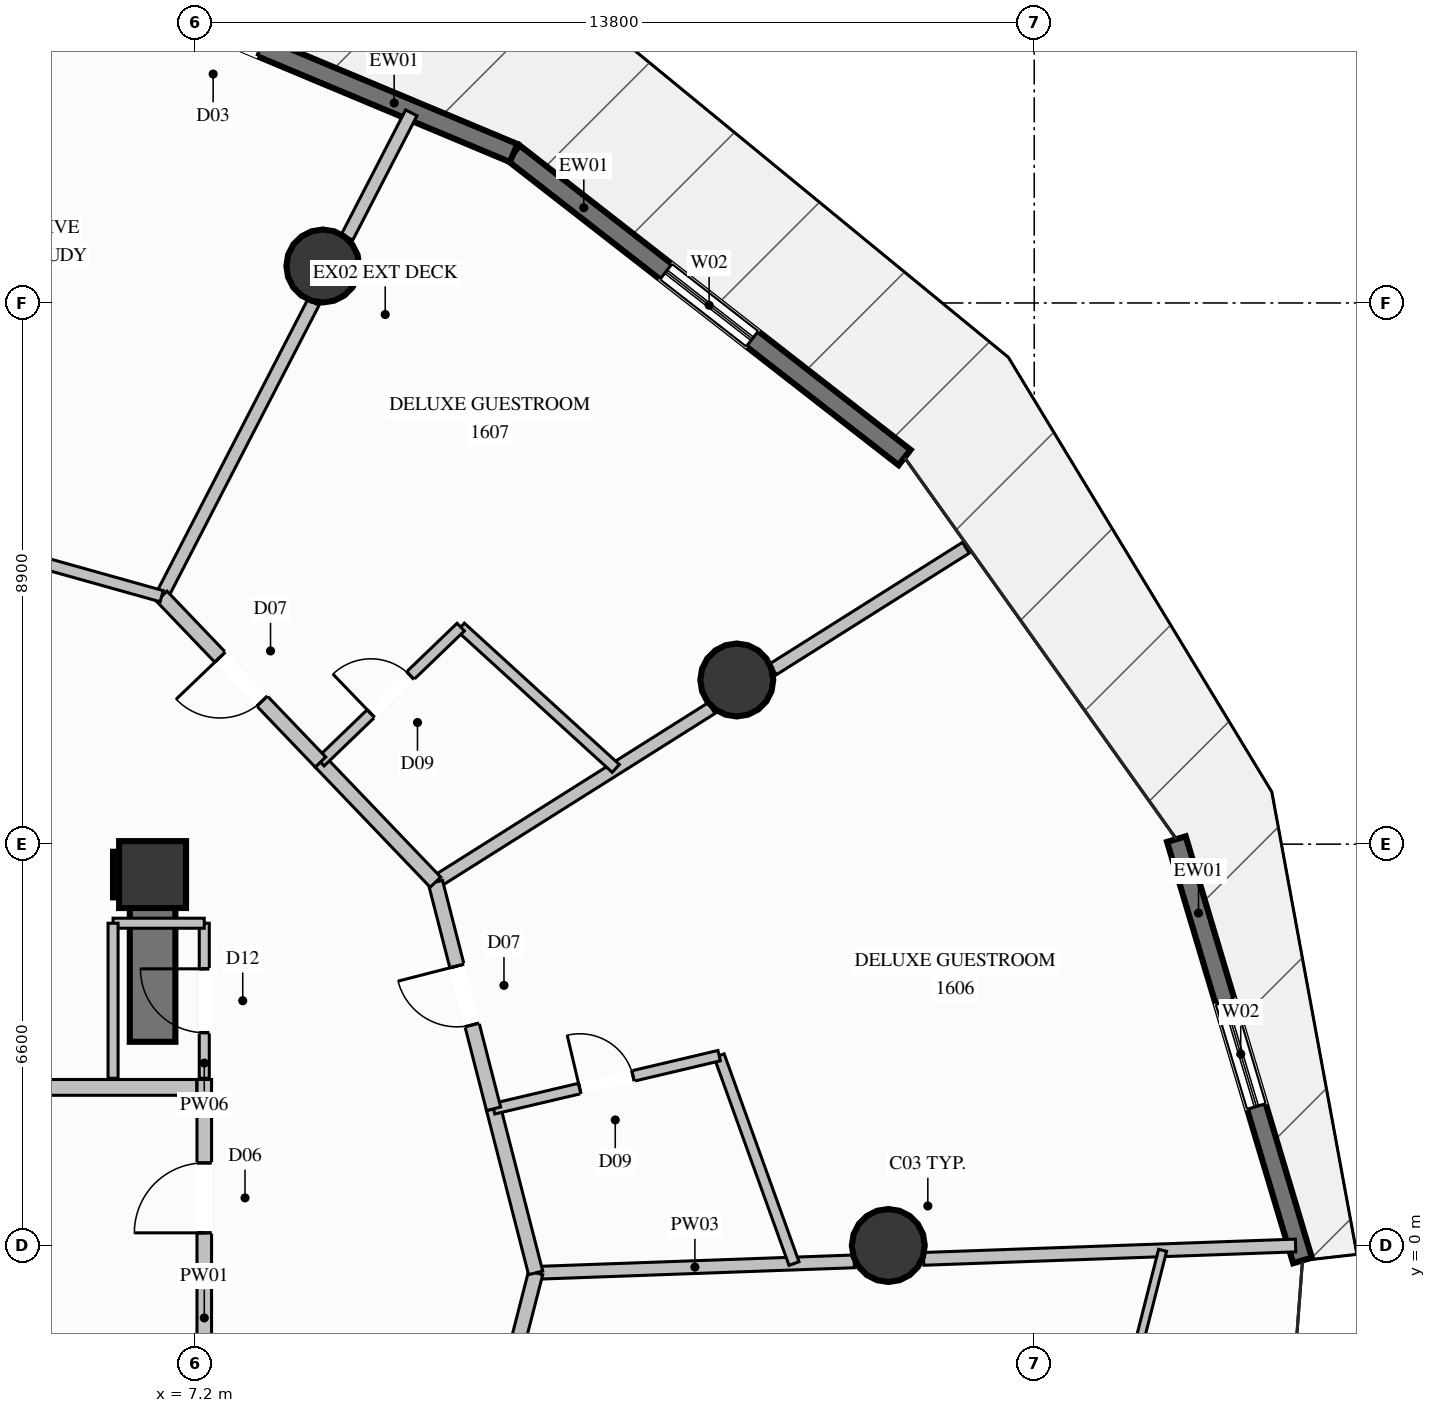
"""IFC4 building model, lengths in metres.
Left out: names, types, materials, properties, quantities, classifications, styles, units other than length and angle.
Written with IfcOpenShell. Run it as: python <this file> out.ifc"""

import sys

from ifc_helpers import new_model, si_unit, direction, frame, frame_2d, origin, origin_2d, place, context, subcontext, project, spatial, rectangle, circle, extrude, element, fill, save


model = new_model("IFC4")
c1 = context("Model", 3, precision=1e-05, world=origin(), true_north=direction((0.0, 1.0)))
c2 = subcontext(c1, "Body", "Model", "MODEL_VIEW")
j1 = project(units=[si_unit("LENGTHUNIT", "METRE"), si_unit("PLANEANGLEUNIT", "RADIAN")], contexts=[c1])
p1 = place(None, origin())
s1 = spatial("IfcSite", under=j1, at=p1, CompositionType="ELEMENT")
p2 = place(p1, origin())
s2 = spatial("IfcBuilding", under=s1, at=p2, CompositionType="ELEMENT")
p3 = place(p2, frame((0.0, 0.0, 60.8)))
s3 = spatial("IfcBuildingStorey", under=s2, at=p3, CompositionType="ELEMENT", Elevation=60.8)
p4 = place(p3, frame((6.5, 6.1, 0.0), z_axis=(0.0, 0.0, 1.0), x_axis=(1.0, 0.0, 0.0)))
e1 = element("IfcColumn", 1, at=p4, inside=s3, PredefinedType="COLUMN", context=c2, shape_type="SweptSolid", body=[
    extrude(rectangle(XDim=1.1, YDim=1.1, at=origin_2d()), origin(), (0.0, 0.0, 1.0), 3.6),
])
p5 = place(p3, frame((5.85, 6.1, 0.0), z_axis=(0.0, 0.0, 1.0), x_axis=(1.0, 0.0, 0.0)))
e2 = element("IfcWall", 2, at=p5, inside=s3, PredefinedType="SHEAR", context=c2, shape_type="SweptSolid", body=[
    extrude(rectangle(XDim=0.275, YDim=0.75, at=frame_2d((0.137, 0.0))), origin(), (0.0, 0.0, 1.0), 3.6),
])
p6 = place(p3, frame((6.5, 3.35, 0.0), z_axis=(0.0, 0.0, 1.0), x_axis=(0.0, 1.0, 0.0)))
e3 = element("IfcWall", 3, at=p6, inside=s3, PredefinedType="SHEAR", context=c2, shape_type="SweptSolid", body=[
    extrude(rectangle(XDim=3.125, YDim=0.75, at=frame_2d((1.562, 0.0))), origin(), (0.0, 0.0, 1.0), 3.6),
])
for number, where, z_axis, x_axis in (
    (4, (18.6, 0.0, 0.0), (0.0, 0.0, 1.0), (1.0, 0.0, 0.0)),
    (5, (16.108, 9.3, 0.0), (0.0, 0.0, 1.0), (1.0, 0.0, 0.0)),
    (6, (9.3, 16.108, 0.0), (0.0, 0.0, 1.0), (1.0, 0.0, 0.0)),
):
    element("IfcColumn", number, at=place(p3, frame(where, z_axis=z_axis, x_axis=x_axis)), inside=s3, PredefinedType="COLUMN", context=c2, shape_type="SweptSolid", body=[
        extrude(circle(Radius=0.6, at=origin_2d()), origin(), (0.0, 0.0, 1.0), 3.6),
    ])
p7 = place(p3, frame((23.338, 6.683, 0.0), z_axis=(0.0, 0.0, 1.0), x_axis=(0.286771852206, -0.957998906462, 0.0)))
e7 = element("IfcWall", 7, at=p7, inside=s3, PredefinedType="SOLIDWALL", context=c2, shape_type="SweptSolid", body=[
    extrude(rectangle(XDim=7.233, YDim=0.32, at=frame_2d((3.616, 0.0))), origin(), (0.0, 0.0, 1.0), 3.34),
])
p8 = place(p7, frame((2.789, 0.0, 0.35)))
e8 = element("IfcOpeningElement", 8, at=p8, cuts=e7, PredefinedType="OPENING", context=c2, shape_type="SweptSolid", body=[
    extrude(rectangle(XDim=1.8, YDim=2.6, at=frame_2d((0.9, 1.3))), frame((0.0, 0.17, 0.0), z_axis=(0.0, -1.0, 0.0), x_axis=(1.0, 0.0, 0.0)), (0.0, 0.0, 1.0), 0.34),
])
p9 = place(p3, frame((12.438, 17.966, 0.0), z_axis=(0.0, 0.0, 1.0), x_axis=(0.788993974252, -0.614400934728, 0.0)))
e9 = element("IfcWall", 9, at=p9, inside=s3, PredefinedType="SOLIDWALL", context=c2, shape_type="SweptSolid", body=[
    extrude(rectangle(XDim=8.149, YDim=0.32, at=frame_2d((4.075, 0.0))), origin(), (0.0, 0.0, 1.0), 3.34),
])
p10 = place(p9, frame((3.175, 0.0, 0.35)))
e10 = element("IfcOpeningElement", 10, at=p10, cuts=e9, PredefinedType="OPENING", context=c2, shape_type="SweptSolid", body=[
    extrude(rectangle(XDim=1.8, YDim=2.6, at=frame_2d((0.9, 1.3))), frame((0.0, 0.17, 0.0), z_axis=(0.0, -1.0, 0.0), x_axis=(1.0, 0.0, 0.0)), (0.0, 0.0, 1.0), 0.34),
])
p11 = place(p3, frame((4.677, 21.214, 0.0), z_axis=(0.0, 0.0, 1.0), x_axis=(0.922472234025, -0.386063437084, 0.0)))
e11 = element("IfcWall", 11, at=p11, inside=s3, PredefinedType="SOLIDWALL", context=c2, shape_type="SweptSolid", body=[
    extrude(rectangle(XDim=8.413, YDim=0.32, at=frame_2d((4.207, 0.0))), origin(), (0.0, 0.0, 1.0), 3.34),
])
p12 = place(p11, frame((0.476, 0.0, 0.35)))
e12 = element("IfcOpeningElement", 12, at=p12, cuts=e11, PredefinedType="OPENING", context=c2, shape_type="SweptSolid", body=[
    extrude(rectangle(XDim=1.8, YDim=2.6, at=frame_2d((0.9, 1.3))), frame((0.0, 0.17, 0.0), z_axis=(0.0, -1.0, 0.0), x_axis=(1.0, 0.0, 0.0)), (0.0, 0.0, 1.0), 0.34),
])
p13 = place(p11, frame((2.803, 0.0, 0.0)))
e13 = element("IfcOpeningElement", 13, at=p13, cuts=e11, PredefinedType="OPENING", context=c2, shape_type="SweptSolid", body=[
    extrude(rectangle(XDim=1.1, YDim=2.2, at=frame_2d((0.55, 1.1))), frame((0.0, 0.17, 0.0), z_axis=(0.0, -1.0, 0.0), x_axis=(1.0, 0.0, 0.0)), (0.0, 0.0, 1.0), 0.34),
])
p14 = place(p3, frame((7.35, -2.34, 0.0), z_axis=(0.0, 0.0, 1.0), x_axis=(0.0, 1.0, 0.0)))
e14 = element("IfcWall", 14, at=p14, inside=s3, PredefinedType="PARTITIONING", context=c2, shape_type="SweptSolid", body=[
    extrude(rectangle(XDim=5.07, YDim=0.24, at=frame_2d((2.535, 0.0))), origin(), (0.0, 0.0, 1.0), 2.425),
])
p15 = place(p14, frame((2.548, 0.0, 0.0)))
e15 = element("IfcOpeningElement", 15, at=p15, cuts=e14, PredefinedType="OPENING", context=c2, shape_type="SweptSolid", body=[
    extrude(rectangle(XDim=1.15, YDim=2.2, at=frame_2d((0.575, 1.1))), frame((0.0, 0.13, 0.0), z_axis=(0.0, -1.0, 0.0), x_axis=(1.0, 0.0, 0.0)), (0.0, 0.0, 1.0), 0.26),
])
p16 = place(p3, frame((4.13, 2.6, 0.0), z_axis=(0.0, 0.0, 1.0), x_axis=(1.0, 0.0, 0.0)))
e16 = element("IfcWall", 16, at=p16, inside=s3, PredefinedType="PARTITIONING", context=c2, shape_type="SweptSolid", body=[
    extrude(rectangle(XDim=3.095, YDim=0.26, at=frame_2d((1.548, 0.0))), origin(), (0.0, 0.0, 1.0), 3.34),
])
p17 = place(p3, frame((7.35, 2.75, 0.0), z_axis=(0.0, 0.0, 1.0), x_axis=(0.0, 1.0, 0.0)))
e17 = element("IfcWall", 17, at=p17, inside=s3, PredefinedType="PARTITIONING", context=c2, shape_type="SweptSolid", body=[
    extrude(rectangle(XDim=2.55, YDim=0.165, at=frame_2d((1.275, 0.0))), origin(), (0.0, 0.0, 1.0), 3.34),
])
p18 = place(p17, frame((0.75, 0.0, 0.0)))
e18 = element("IfcOpeningElement", 18, at=p18, cuts=e17, PredefinedType="OPENING", context=c2, shape_type="SweptSolid", body=[
    extrude(rectangle(XDim=1.05, YDim=2.15, at=frame_2d((0.525, 1.075))), frame((0.0, 0.093, 0.0), z_axis=(0.0, -1.0, 0.0), x_axis=(1.0, 0.0, 0.0)), (0.0, 0.0, 1.0), 0.185),
])
p19 = place(p3, frame((7.35, 5.3, 0.0), z_axis=(0.0, 0.0, 1.0), x_axis=(-1.0, 0.0, 0.0)))
e19 = element("IfcWall", 19, at=p19, inside=s3, PredefinedType="PARTITIONING", context=c2, shape_type="SweptSolid", body=[
    extrude(rectangle(XDim=1.5, YDim=0.165, at=frame_2d((0.75, 0.0))), origin(), (0.0, 0.0, 1.0), 2.425),
])
p20 = place(p3, frame((5.85, 5.3, 0.0), z_axis=(0.0, 0.0, 1.0), x_axis=(0.0, -1.0, 0.0)))
e20 = element("IfcWall", 20, at=p20, inside=s3, PredefinedType="PARTITIONING", context=c2, shape_type="SweptSolid", body=[
    extrude(rectangle(XDim=2.55, YDim=0.165, at=frame_2d((1.275, 0.0))), origin(), (0.0, 0.0, 1.0), 2.425),
])
p21 = place(p3, frame((12.8, -0.45, 0.0), z_axis=(0.0, 0.0, 1.0), x_axis=(0.999349913371, 0.03605205467, 0.0)))
e21 = element("IfcWall", 21, at=p21, inside=s3, PredefinedType="PARTITIONING", context=c2, shape_type="SweptSolid", body=[
    extrude(rectangle(XDim=5.241, YDim=0.21, at=frame_2d((2.621, 0.0))), origin(), (0.0, 0.0, 1.0), 2.709),
])
p22 = place(p3, frame((19.18, -0.22, 0.0), z_axis=(0.0, 0.0, 1.0), x_axis=(0.999354291278, 0.035930495469, 0.0)))
e22 = element("IfcWall", 22, at=p22, inside=s3, PredefinedType="PARTITIONING", context=c2, shape_type="SweptSolid", body=[
    extrude(rectangle(XDim=6.122, YDim=0.21, at=frame_2d((3.061, 0.0))), origin(), (0.0, 0.0, 1.0), 3.34),
])
p23 = place(p3, frame((11.152, 5.975, 0.0), z_axis=(0.0, 0.0, 1.0), x_axis=(0.845979114039, 0.533216033714, 0.0)))
e23 = element("IfcWall", 23, at=p23, inside=s3, PredefinedType="PARTITIONING", context=c2, shape_type="SweptSolid", body=[
    extrude(rectangle(XDim=5.369, YDim=0.21, at=frame_2d((2.685, 0.0))), origin(), (0.0, 0.0, 1.0), 2.709),
])
p24 = place(p3, frame((16.703, 9.475, 0.0), z_axis=(0.0, 0.0, 1.0), x_axis=(0.845977305375, 0.533218903257, 0.0)))
e24 = element("IfcWall", 24, at=p24, inside=s3, PredefinedType="PARTITIONING", context=c2, shape_type="SweptSolid", body=[
    extrude(rectangle(XDim=3.751, YDim=0.21, at=frame_2d((1.875, 0.0))), origin(), (0.0, 0.0, 1.0), 3.34),
])
p25 = place(p3, frame((6.65, 10.678, 0.0), z_axis=(0.0, 0.0, 1.0), x_axis=(0.458816800398, 0.888530890669, 0.0)))
e25 = element("IfcWall", 25, at=p25, inside=s3, PredefinedType="PARTITIONING", context=c2, shape_type="SweptSolid", body=[
    extrude(rectangle(XDim=5.436, YDim=0.21, at=frame_2d((2.718, 0.0))), origin(), (0.0, 0.0, 1.0), 2.709),
])
p26 = place(p3, frame((9.699, 16.582, 0.0), z_axis=(0.0, 0.0, 1.0), x_axis=(0.45880233967, 0.888538357705, 0.0)))
e26 = element("IfcWall", 26, at=p26, inside=s3, PredefinedType="PARTITIONING", context=c2, shape_type="SweptSolid", body=[
    extrude(rectangle(XDim=2.302, YDim=0.21, at=frame_2d((1.151, 0.0))), origin(), (0.0, 0.0, 1.0), 3.34),
])
p27 = place(p3, frame((11.152, -6.875, 0.0), z_axis=(0.0, 0.0, 1.0), x_axis=(0.248446193127, 0.968645698447, 0.0)))
e27 = element("IfcWall", 27, at=p27, inside=s3, PredefinedType="PARTITIONING", context=c2, shape_type="SweptSolid", body=[
    extrude(rectangle(XDim=6.633, YDim=0.24, at=frame_2d((3.316, 0.0))), origin(), (0.0, 0.0, 1.0), 3.34),
])
p28 = place(p3, frame((20.16, -11.716, 0.0), z_axis=(0.0, 0.0, 1.0), x_axis=(0.245821486201, 0.969315117453, 0.0)))
e28 = element("IfcWall", 28, at=p28, inside=s3, PredefinedType="PARTITIONING", context=c2, shape_type="SweptSolid", body=[
    extrude(rectangle(XDim=12.005, YDim=0.135, at=frame_2d((6.003, 0.0))), origin(), (0.0, 0.0, 1.0), 3.34),
])
p29 = place(p28, frame((5.528, 0.0, 0.0)))
e29 = element("IfcOpeningElement", 29, at=p29, cuts=e28, PredefinedType="OPENING", context=c2, shape_type="SweptSolid", body=[
    extrude(rectangle(XDim=0.95, YDim=2.1, at=frame_2d((0.475, 1.05))), frame((0.0, 0.078, 0.0), z_axis=(0.0, -1.0, 0.0), x_axis=(1.0, 0.0, 0.0)), (0.0, 0.0, 1.0), 0.155),
])
p30 = place(p3, frame((12.8, -0.45, 0.0), z_axis=(0.0, 0.0, 1.0), x_axis=(-0.248491333658, 0.968634119313, 0.0)))
e30 = element("IfcWall", 30, at=p30, inside=s3, PredefinedType="PARTITIONING", context=c2, shape_type="SweptSolid", body=[
    extrude(rectangle(XDim=2.785, YDim=0.24, at=frame_2d((1.393, 0.0))), origin(), (0.0, 0.0, 1.0), 3.34),
])
p31 = place(p3, frame((17.049, -0.297, 0.0), z_axis=(0.0, 0.0, 1.0), x_axis=(-0.338731363066, 0.940883129658, 0.0)))
e31 = element("IfcWall", 31, at=p31, inside=s3, PredefinedType="PLUMBINGWALL", context=c2, shape_type="SweptSolid", body=[
    extrude(rectangle(XDim=3.634, YDim=0.175, at=frame_2d((1.817, 0.0))), origin(), (0.0, 0.0, 1.0), 3.34),
])
p32 = place(p3, frame((12.108, 2.248, 0.0), z_axis=(0.0, 0.0, 1.0), x_axis=(0.973356655093, 0.229296362784, 0.0)))
e32 = element("IfcWall", 32, at=p32, inside=s3, PredefinedType="PLUMBINGWALL", context=c2, shape_type="SweptSolid", body=[
    extrude(rectangle(XDim=3.812, YDim=0.175, at=frame_2d((1.906, 0.0))), origin(), (0.0, 0.0, 1.0), 3.34),
])
p33 = place(p32, frame((1.456, 0.0, 0.0)))
e33 = element("IfcOpeningElement", 33, at=p33, cuts=e32, PredefinedType="OPENING", context=c2, shape_type="SweptSolid", body=[
    extrude(rectangle(XDim=0.9, YDim=2.1, at=frame_2d((0.45, 1.05))), frame((0.0, 0.098, 0.0), z_axis=(0.0, -1.0, 0.0), x_axis=(1.0, 0.0, 0.0)), (0.0, 0.0, 1.0), 0.195),
])
p34 = place(p3, frame((12.108, 2.248, 0.0), z_axis=(0.0, 0.0, 1.0), x_axis=(-0.248413515056, 0.9686540794, 0.0)))
e34 = element("IfcWall", 34, at=p34, inside=s3, PredefinedType="PARTITIONING", context=c2, shape_type="SweptSolid", body=[
    extrude(rectangle(XDim=3.848, YDim=0.24, at=frame_2d((1.924, 0.0))), origin(), (0.0, 0.0, 1.0), 3.34),
])
p35 = place(p34, frame((1.424, 0.0, 0.0)))
e35 = element("IfcOpeningElement", 35, at=p35, cuts=e34, PredefinedType="OPENING", context=c2, shape_type="SweptSolid", body=[
    extrude(rectangle(XDim=1.0, YDim=2.2, at=frame_2d((0.5, 1.1))), frame((0.0, 0.13, 0.0), z_axis=(0.0, -1.0, 0.0), x_axis=(1.0, 0.0, 0.0)), (0.0, 0.0, 1.0), 0.26),
])
p36 = place(p3, frame((11.152, 5.975, 0.0), z_axis=(0.0, 0.0, 1.0), x_axis=(-0.69162799291, 0.72225391617, 0.0)))
e36 = element("IfcWall", 36, at=p36, inside=s3, PredefinedType="PARTITIONING", context=c2, shape_type="SweptSolid", body=[
    extrude(rectangle(XDim=2.734, YDim=0.24, at=frame_2d((1.367, 0.0))), origin(), (0.0, 0.0, 1.0), 3.34),
])
p37 = place(p3, frame((14.118, 7.845, 0.0), z_axis=(0.0, 0.0, 1.0), x_axis=(-0.738937194697, 0.673774311097, 0.0)))
e37 = element("IfcWall", 37, at=p37, inside=s3, PredefinedType="PLUMBINGWALL", context=c2, shape_type="SweptSolid", body=[
    extrude(rectangle(XDim=3.451, YDim=0.175, at=frame_2d((1.725, 0.0))), origin(), (0.0, 0.0, 1.0), 3.34),
])
p38 = place(p3, frame((9.261, 7.95, 0.0), z_axis=(0.0, 0.0, 1.0), x_axis=(0.720586854317, 0.693364684265, 0.0)))
e38 = element("IfcWall", 38, at=p38, inside=s3, PredefinedType="PLUMBINGWALL", context=c2, shape_type="SweptSolid", body=[
    extrude(rectangle(XDim=3.202, YDim=0.175, at=frame_2d((1.601, 0.0))), origin(), (0.0, 0.0, 1.0), 3.34),
])
p39 = place(p38, frame((1.151, 0.0, 0.0)))
e39 = element("IfcOpeningElement", 39, at=p39, cuts=e38, PredefinedType="OPENING", context=c2, shape_type="SweptSolid", body=[
    extrude(rectangle(XDim=0.9, YDim=2.1, at=frame_2d((0.45, 1.05))), frame((0.0, 0.098, 0.0), z_axis=(0.0, -1.0, 0.0), x_axis=(1.0, 0.0, 0.0)), (0.0, 0.0, 1.0), 0.195),
])
p40 = place(p3, frame((9.261, 7.95, 0.0), z_axis=(0.0, 0.0, 1.0), x_axis=(-0.691453073155, 0.722421378161, 0.0)))
e40 = element("IfcWall", 40, at=p40, inside=s3, PredefinedType="PARTITIONING", context=c2, shape_type="SweptSolid", body=[
    extrude(rectangle(XDim=3.776, YDim=0.24, at=frame_2d((1.888, 0.0))), origin(), (0.0, 0.0, 1.0), 3.34),
])
p41 = place(p40, frame((1.388, 0.0, 0.0)))
e41 = element("IfcOpeningElement", 41, at=p41, cuts=e40, PredefinedType="OPENING", context=c2, shape_type="SweptSolid", body=[
    extrude(rectangle(XDim=1.0, YDim=2.2, at=frame_2d((0.5, 1.1))), frame((0.0, 0.13, 0.0), z_axis=(0.0, -1.0, 0.0), x_axis=(1.0, 0.0, 0.0)), (0.0, 0.0, 1.0), 0.26),
])
p42 = place(p3, frame((6.65, 10.678, 0.0), z_axis=(0.0, 0.0, 1.0), x_axis=(-0.962966004827, 0.26962283573, 0.0)))
e42 = element("IfcWall", 42, at=p42, inside=s3, PredefinedType="PARTITIONING", context=c2, shape_type="SweptSolid", body=[
    extrude(rectangle(XDim=6.386, YDim=0.19, at=frame_2d((3.193, 0.0))), origin(), (0.0, 0.0, 1.0), 3.34),
])
p43 = place(p42, frame((2.718, 0.0, 0.0)))
e43 = element("IfcOpeningElement", 43, at=p43, cuts=e42, PredefinedType="OPENING", context=c2, shape_type="SweptSolid", body=[
    extrude(rectangle(XDim=0.95, YDim=2.1, at=frame_2d((0.475, 1.05))), frame((0.0, 0.105, 0.0), z_axis=(0.0, -1.0, 0.0), x_axis=(1.0, 0.0, 0.0)), (0.0, 0.0, 1.0), 0.21),
])
p44 = place(p8, origin())
e44 = element("IfcWindow", 44, at=p44, inside=s3, PartitioningType="SINGLE_PANEL", PredefinedType="WINDOW", context=c2, shape_type="SweptSolid", body=[
    extrude(rectangle(XDim=1.8, YDim=2.6, at=frame_2d((0.9, 1.3))), frame((0.0, 0.03, 0.0), z_axis=(0.0, -1.0, 0.0), x_axis=(1.0, 0.0, 0.0)), (0.0, 0.0, 1.0), 0.06),
])
fill(e8, e44)
p45 = place(p10, origin())
e45 = element("IfcWindow", 45, at=p45, inside=s3, PartitioningType="SINGLE_PANEL", PredefinedType="WINDOW", context=c2, shape_type="SweptSolid", body=[
    extrude(rectangle(XDim=1.8, YDim=2.6, at=frame_2d((0.9, 1.3))), frame((0.0, 0.03, 0.0), z_axis=(0.0, -1.0, 0.0), x_axis=(1.0, 0.0, 0.0)), (0.0, 0.0, 1.0), 0.06),
])
fill(e10, e45)
p46 = place(p15, origin())
e46 = element("IfcDoor", 46, at=p46, inside=s3, OperationType="SINGLE_SWING_LEFT", PredefinedType="DOOR", context=c2, shape_type="SweptSolid", body=[
    extrude(rectangle(XDim=1.15, YDim=2.2, at=frame_2d((0.575, 1.1))), frame((0.0, 0.025, 0.0), z_axis=(0.0, -1.0, 0.0), x_axis=(1.0, 0.0, 0.0)), (0.0, 0.0, 1.0), 0.05),
])
fill(e15, e46)
p47 = place(p18, origin())
e47 = element("IfcDoor", 47, at=p47, inside=s3, OperationType="SINGLE_SWING_RIGHT", PredefinedType="DOOR", context=c2, shape_type="SweptSolid", body=[
    extrude(rectangle(XDim=1.05, YDim=2.15, at=frame_2d((0.525, 1.075))), frame((0.0, 0.025, 0.0), z_axis=(0.0, -1.0, 0.0), x_axis=(1.0, 0.0, 0.0)), (0.0, 0.0, 1.0), 0.05),
])
fill(e18, e47)
p48 = place(p33, origin())
e48 = element("IfcDoor", 48, at=p48, inside=s3, OperationType="SINGLE_SWING_LEFT", PredefinedType="DOOR", context=c2, shape_type="SweptSolid", body=[
    extrude(rectangle(XDim=0.9, YDim=2.1, at=frame_2d((0.45, 1.05))), frame((0.0, 0.025, 0.0), z_axis=(0.0, -1.0, 0.0), x_axis=(1.0, 0.0, 0.0)), (0.0, 0.0, 1.0), 0.05),
])
fill(e33, e48)
p49 = place(p35, origin())
e49 = element("IfcDoor", 49, at=p49, inside=s3, OperationType="SINGLE_SWING_RIGHT", PredefinedType="DOOR", context=c2, shape_type="SweptSolid", body=[
    extrude(rectangle(XDim=1.0, YDim=2.2, at=frame_2d((0.5, 1.1))), frame((0.0, 0.025, 0.0), z_axis=(0.0, -1.0, 0.0), x_axis=(1.0, 0.0, 0.0)), (0.0, 0.0, 1.0), 0.05),
])
fill(e35, e49)
p50 = place(p39, origin())
e50 = element("IfcDoor", 50, at=p50, inside=s3, OperationType="SINGLE_SWING_LEFT", PredefinedType="DOOR", context=c2, shape_type="SweptSolid", body=[
    extrude(rectangle(XDim=0.9, YDim=2.1, at=frame_2d((0.45, 1.05))), frame((0.0, 0.025, 0.0), z_axis=(0.0, -1.0, 0.0), x_axis=(1.0, 0.0, 0.0)), (0.0, 0.0, 1.0), 0.05),
])
fill(e39, e50)
p51 = place(p41, origin())
e51 = element("IfcDoor", 51, at=p51, inside=s3, OperationType="SINGLE_SWING_RIGHT", PredefinedType="DOOR", context=c2, shape_type="SweptSolid", body=[
    extrude(rectangle(XDim=1.0, YDim=2.2, at=frame_2d((0.5, 1.1))), frame((0.0, 0.025, 0.0), z_axis=(0.0, -1.0, 0.0), x_axis=(1.0, 0.0, 0.0)), (0.0, 0.0, 1.0), 0.05),
])
fill(e41, e51)
save(model, sys.argv[1])
